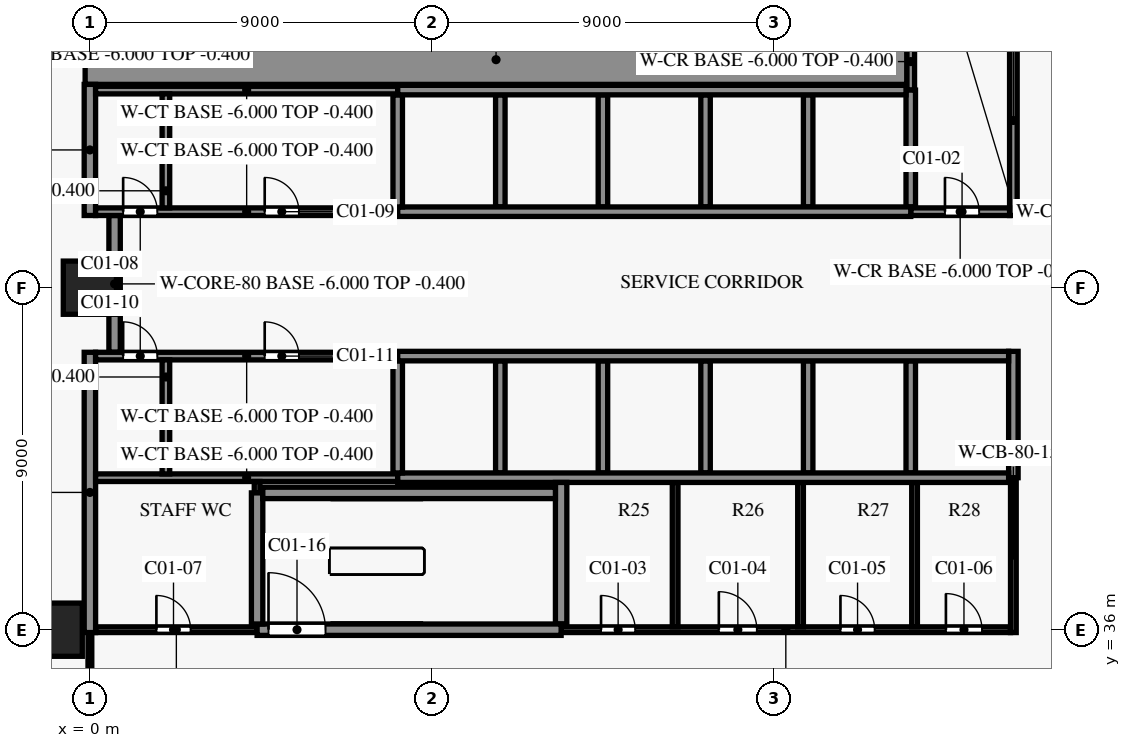
"""IFC4 building model, lengths in metres.
Left out: names, types, materials, properties, quantities, classifications, styles, units other than length and angle.
Written with IfcOpenShell. Run it as: python <this file> out.ifc"""

import sys

from ifc_helpers import new_model, si_unit, direction, frame, frame_2d, origin, origin_2d, place, context, subcontext, project, spatial, rectangle, extrude, element, fill, save


model = new_model("IFC4")
c1 = context("Model", 3, precision=1e-05, world=origin(), true_north=direction((0.0, 1.0)))
c2 = subcontext(c1, "Body", "Model", "MODEL_VIEW")
j1 = project(units=[si_unit("LENGTHUNIT", "METRE"), si_unit("PLANEANGLEUNIT", "RADIAN")], contexts=[c1])
p1 = place(None, origin())
s1 = spatial("IfcSite", under=j1, at=p1, CompositionType="ELEMENT")
p2 = place(p1, origin())
s2 = spatial("IfcBuilding", under=s1, at=p2, CompositionType="ELEMENT")
p3 = place(p2, frame((0.0, 0.0, -6.0)))
s3 = spatial("IfcBuildingStorey", under=s2, at=p3, CompositionType="ELEMENT", Elevation=-6.0)
for number, where, z_axis, x_axis in (
    (1, (0.0, 45.0, 0.0), (0.0, 0.0, 1.0), (1.0, 0.0, 0.0)),
    (2, (-0.9, 36.0, 0.0), (0.0, 0.0, 1.0), (1.0, 0.0, 0.0)),
):
    element("IfcColumn", number, at=place(p3, frame(where, z_axis=z_axis, x_axis=x_axis)), inside=s3, PredefinedType="COLUMN", context=c2, shape_type="SweptSolid", body=[
        extrude(rectangle(XDim=1.4, YDim=1.4, at=origin_2d()), origin(), (0.0, 0.0, 1.0), 6.0),
    ])
p4 = place(p3, frame((0.15, 36.0, 0.0), z_axis=(0.0, 0.0, 1.0), x_axis=(1.0, 0.0, 0.0)))
e3 = element("IfcWall", 3, at=p4, inside=s3, PredefinedType="PARTITIONING", context=c2, shape_type="SweptSolid", body=[
    extrude(rectangle(XDim=4.25, YDim=0.15, at=frame_2d((2.125, 0.0))), origin(), (0.0, 0.0, 1.0), 5.6),
])
p5 = place(p4, frame((1.6, 0.0, 0.0)))
e4 = element("IfcOpeningElement", 4, at=p5, cuts=e3, PredefinedType="OPENING", context=c2, shape_type="SweptSolid", body=[
    extrude(rectangle(XDim=0.9, YDim=2.1, at=frame_2d((0.45, 1.05))), frame((0.0, 0.085, 0.0), z_axis=(0.0, -1.0, 0.0), x_axis=(1.0, 0.0, 0.0)), (0.0, 0.0, 1.0), 0.17),
])
p6 = place(p3, frame((12.4, 36.0, 0.0), z_axis=(0.0, 0.0, 1.0), x_axis=(1.0, 0.0, 0.0)))
e5 = element("IfcWall", 5, at=p6, inside=s3, PredefinedType="SHEAR", context=c2, shape_type="SweptSolid", body=[
    extrude(rectangle(XDim=11.825, YDim=0.15, at=frame_2d((5.913, 0.0))), origin(), (0.0, 0.0, 1.0), 5.6),
])
p7 = place(p6, frame((1.05, 0.0, 0.0)))
e6 = element("IfcOpeningElement", 6, at=p7, cuts=e5, PredefinedType="OPENING", context=c2, shape_type="SweptSolid", body=[
    extrude(rectangle(XDim=0.9, YDim=2.1, at=frame_2d((0.45, 1.05))), frame((0.0, 0.085, 0.0), z_axis=(0.0, -1.0, 0.0), x_axis=(1.0, 0.0, 0.0)), (0.0, 0.0, 1.0), 0.17),
])
p8 = place(p6, frame((4.15, 0.0, 0.0)))
e7 = element("IfcOpeningElement", 7, at=p8, cuts=e5, PredefinedType="OPENING", context=c2, shape_type="SweptSolid", body=[
    extrude(rectangle(XDim=1.0, YDim=2.1, at=frame_2d((0.5, 1.05))), frame((0.0, 0.085, 0.0), z_axis=(0.0, -1.0, 0.0), x_axis=(1.0, 0.0, 0.0)), (0.0, 0.0, 1.0), 0.17),
])
p9 = place(p6, frame((7.35, 0.0, 0.0)))
e8 = element("IfcOpeningElement", 8, at=p9, cuts=e5, PredefinedType="OPENING", context=c2, shape_type="SweptSolid", body=[
    extrude(rectangle(XDim=0.9, YDim=2.1, at=frame_2d((0.45, 1.05))), frame((0.0, 0.085, 0.0), z_axis=(0.0, -1.0, 0.0), x_axis=(1.0, 0.0, 0.0)), (0.0, 0.0, 1.0), 0.17),
])
p10 = place(p6, frame((10.125, 0.0, 0.0)))
e9 = element("IfcOpeningElement", 9, at=p10, cuts=e5, PredefinedType="OPENING", context=c2, shape_type="SweptSolid", body=[
    extrude(rectangle(XDim=0.95, YDim=2.1, at=frame_2d((0.475, 1.05))), frame((0.0, 0.085, 0.0), z_axis=(0.0, -1.0, 0.0), x_axis=(1.0, 0.0, 0.0)), (0.0, 0.0, 1.0), 0.17),
])
p11 = place(p3, frame((4.4, 36.0, 0.0), z_axis=(0.0, 0.0, 1.0), x_axis=(1.0, 0.0, 0.0)))
e10 = element("IfcWall", 10, at=p11, inside=s3, PredefinedType="SHEAR", context=c2, shape_type="SweptSolid", body=[
    extrude(rectangle(XDim=8.0, YDim=0.3, at=frame_2d((4.0, 0.0))), origin(), (0.0, 0.0, 1.0), 5.6),
])
p12 = place(p11, frame((0.3, 0.0, 0.0)))
e11 = element("IfcOpeningElement", 11, at=p12, cuts=e10, PredefinedType="OPENING", context=c2, shape_type="SweptSolid", body=[
    extrude(rectangle(XDim=1.5, YDim=2.2, at=frame_2d((0.75, 1.1))), frame((0.0, 0.16, 0.0), z_axis=(0.0, -1.0, 0.0), x_axis=(1.0, 0.0, 0.0)), (0.0, 0.0, 1.0), 0.32),
])
p13 = place(p3, frame((4.55, 39.6, 0.0), z_axis=(0.0, 0.0, 1.0), x_axis=(1.0, 0.0, 0.0)))
e12 = element("IfcWall", 12, at=p13, inside=s3, PredefinedType="SHEAR", context=c2, shape_type="SweptSolid", body=[
    extrude(rectangle(XDim=7.7, YDim=0.3, at=frame_2d((3.85, 0.0))), origin(), (0.0, 0.0, 1.0), 5.6),
])
p14 = place(p3, frame((0.15, 40.0, 0.0), z_axis=(0.0, 0.0, 1.0), x_axis=(1.0, 0.0, 0.0)))
e13 = element("IfcWall", 13, at=p14, inside=s3, PredefinedType="PARTITIONING", context=c2, shape_type="SweptSolid", body=[
    extrude(rectangle(XDim=7.95, YDim=0.2, at=frame_2d((3.975, 0.0))), origin(), (0.0, 0.0, 1.0), 5.6),
])
p15 = place(p3, frame((8.1, 40.0, 0.0), z_axis=(0.0, 0.0, 1.0), x_axis=(1.0, 0.0, 0.0)))
e14 = element("IfcWall", 14, at=p15, inside=s3, PredefinedType="SHEAR", context=c2, shape_type="SweptSolid", body=[
    extrude(rectangle(XDim=16.075, YDim=0.25, at=frame_2d((8.038, 0.0))), origin(), (0.0, 0.0, 1.0), 5.6),
])
p16 = place(p3, frame((0.15, 43.2, 0.0), z_axis=(0.0, 0.0, 1.0), x_axis=(1.0, 0.0, 0.0)))
e15 = element("IfcWall", 15, at=p16, inside=s3, PredefinedType="PARTITIONING", context=c2, shape_type="SweptSolid", body=[
    extrude(rectangle(XDim=7.95, YDim=0.2, at=frame_2d((3.975, 0.0))), origin(), (0.0, 0.0, 1.0), 5.6),
])
p17 = place(p16, frame((0.725, 0.0, 0.0)))
e16 = element("IfcOpeningElement", 16, at=p17, cuts=e15, PredefinedType="OPENING", context=c2, shape_type="SweptSolid", body=[
    extrude(rectangle(XDim=0.9, YDim=2.1, at=frame_2d((0.45, 1.05))), frame((0.0, 0.11, 0.0), z_axis=(0.0, -1.0, 0.0), x_axis=(1.0, 0.0, 0.0)), (0.0, 0.0, 1.0), 0.22),
])
p18 = place(p16, frame((4.45, 0.0, 0.0)))
e17 = element("IfcOpeningElement", 17, at=p18, cuts=e15, PredefinedType="OPENING", context=c2, shape_type="SweptSolid", body=[
    extrude(rectangle(XDim=0.9, YDim=2.1, at=frame_2d((0.45, 1.05))), frame((0.0, 0.11, 0.0), z_axis=(0.0, -1.0, 0.0), x_axis=(1.0, 0.0, 0.0)), (0.0, 0.0, 1.0), 0.22),
])
p19 = place(p3, frame((8.1, 43.2, 0.0), z_axis=(0.0, 0.0, 1.0), x_axis=(1.0, 0.0, 0.0)))
e18 = element("IfcWall", 18, at=p19, inside=s3, PredefinedType="SHEAR", context=c2, shape_type="SweptSolid", body=[
    extrude(rectangle(XDim=16.075, YDim=0.25, at=frame_2d((8.038, 0.0))), origin(), (0.0, 0.0, 1.0), 5.6),
])
p20 = place(p3, frame((0.15, 47.0, 0.0), z_axis=(0.0, 0.0, 1.0), x_axis=(1.0, 0.0, 0.0)))
e19 = element("IfcWall", 19, at=p20, inside=s3, PredefinedType="PARTITIONING", context=c2, shape_type="SweptSolid", body=[
    extrude(rectangle(XDim=7.95, YDim=0.2, at=frame_2d((3.975, 0.0))), origin(), (0.0, 0.0, 1.0), 5.6),
])
p21 = place(p20, frame((0.725, 0.0, 0.0)))
e20 = element("IfcOpeningElement", 20, at=p21, cuts=e19, PredefinedType="OPENING", context=c2, shape_type="SweptSolid", body=[
    extrude(rectangle(XDim=0.9, YDim=2.1, at=frame_2d((0.45, 1.05))), frame((0.0, 0.11, 0.0), z_axis=(0.0, -1.0, 0.0), x_axis=(1.0, 0.0, 0.0)), (0.0, 0.0, 1.0), 0.22),
])
p22 = place(p20, frame((4.45, 0.0, 0.0)))
e21 = element("IfcOpeningElement", 21, at=p22, cuts=e19, PredefinedType="OPENING", context=c2, shape_type="SweptSolid", body=[
    extrude(rectangle(XDim=0.9, YDim=2.1, at=frame_2d((0.45, 1.05))), frame((0.0, 0.11, 0.0), z_axis=(0.0, -1.0, 0.0), x_axis=(1.0, 0.0, 0.0)), (0.0, 0.0, 1.0), 0.22),
])
p23 = place(p3, frame((21.6, 47.0, 0.0), z_axis=(0.0, 0.0, 1.0), x_axis=(1.0, 0.0, 0.0)))
e22 = element("IfcWall", 22, at=p23, inside=s3, PredefinedType="PARTITIONING", context=c2, shape_type="SweptSolid", body=[
    extrude(rectangle(XDim=2.6, YDim=0.2, at=frame_2d((1.3, 0.0))), origin(), (0.0, 0.0, 1.0), 5.6),
])
p24 = place(p23, frame((0.9, 0.0, 0.0)))
e23 = element("IfcOpeningElement", 23, at=p24, cuts=e22, PredefinedType="OPENING", context=c2, shape_type="SweptSolid", body=[
    extrude(rectangle(XDim=0.9, YDim=2.1, at=frame_2d((0.45, 1.05))), frame((0.0, 0.11, 0.0), z_axis=(0.0, -1.0, 0.0), x_axis=(1.0, 0.0, 0.0)), (0.0, 0.0, 1.0), 0.22),
])
p25 = place(p3, frame((8.1, 47.0, 0.0), z_axis=(0.0, 0.0, 1.0), x_axis=(1.0, 0.0, 0.0)))
e24 = element("IfcWall", 24, at=p25, inside=s3, PredefinedType="SHEAR", context=c2, shape_type="SweptSolid", body=[
    extrude(rectangle(XDim=13.5, YDim=0.25, at=frame_2d((6.75, 0.0))), origin(), (0.0, 0.0, 1.0), 5.6),
])
p26 = place(p3, frame((0.15, 50.2, 0.0), z_axis=(0.0, 0.0, 1.0), x_axis=(1.0, 0.0, 0.0)))
e25 = element("IfcWall", 25, at=p26, inside=s3, PredefinedType="PARTITIONING", context=c2, shape_type="SweptSolid", body=[
    extrude(rectangle(XDim=7.95, YDim=0.2, at=frame_2d((3.975, 0.0))), origin(), (0.0, 0.0, 1.0), 5.6),
])
p27 = place(p3, frame((8.1, 50.2, 0.0), z_axis=(0.0, 0.0, 1.0), x_axis=(1.0, 0.0, 0.0)))
e26 = element("IfcWall", 26, at=p27, inside=s3, PredefinedType="SHEAR", context=c2, shape_type="SweptSolid", body=[
    extrude(rectangle(XDim=13.375, YDim=0.25, at=frame_2d((6.688, 0.0))), origin(), (0.0, 0.0, 1.0), 5.6),
])
p28 = place(p3, frame((-0.125, 51.0, 0.0), z_axis=(0.0, 0.0, 1.0), x_axis=(1.0, 0.0, 0.0)))
e27 = element("IfcWall", 27, at=p28, inside=s3, PredefinedType="SHEAR", context=c2, shape_type="SweptSolid", body=[
    extrude(rectangle(XDim=21.625, YDim=1.3, at=frame_2d((10.812, 0.0))), origin(), (0.0, 0.0, 1.0), 5.6),
])
p29 = place(p3, frame((0.0, 35.925, 0.0), z_axis=(0.0, 0.0, 1.0), x_axis=(0.0, 1.0, 0.0)))
e28 = element("IfcWall", 28, at=p29, inside=s3, PredefinedType="SHEAR", context=c2, shape_type="SweptSolid", body=[
    extrude(rectangle(XDim=7.375, YDim=0.3, at=frame_2d((3.688, 0.0))), origin(), (0.0, 0.0, 1.0), 5.6),
])
p30 = place(p3, frame((0.0, 46.9, 0.0), z_axis=(0.0, 0.0, 1.0), x_axis=(0.0, 1.0, 0.0)))
e29 = element("IfcWall", 29, at=p30, inside=s3, PredefinedType="SHEAR", context=c2, shape_type="SweptSolid", body=[
    extrude(rectangle(XDim=3.45, YDim=0.3, at=frame_2d((1.725, 0.0))), origin(), (0.0, 0.0, 1.0), 5.6),
])
p31 = place(p3, frame((0.65, 43.3, 0.0), z_axis=(0.0, 0.0, 1.0), x_axis=(0.0, 1.0, 0.0)))
e30 = element("IfcWall", 30, at=p31, inside=s3, PredefinedType="SHEAR", context=c2, shape_type="SweptSolid", body=[
    extrude(rectangle(XDim=3.6, YDim=0.3, at=frame_2d((1.8, 0.0))), origin(), (0.0, 0.0, 1.0), 5.6),
])
for number, where, z_axis, x_axis in (
    (31, (2.0, 40.1, 0.0), (0.0, 0.0, 1.0), (0.0, 1.0, 0.0)),
    (32, (2.0, 47.1, 0.0), (0.0, 0.0, 1.0), (0.0, 1.0, 0.0)),
):
    element("IfcWall", number, at=place(p3, frame(where, z_axis=z_axis, x_axis=x_axis)), inside=s3, PredefinedType="PARTITIONING", context=c2, shape_type="SweptSolid", body=[
        extrude(rectangle(XDim=3.0, YDim=0.2, at=frame_2d((1.5, 0.0))), origin(), (0.0, 0.0, 1.0), 5.6),
    ])
p32 = place(p3, frame((4.4, 39.6, 0.0), z_axis=(0.0, 0.0, 1.0), x_axis=(0.0, 1.0, 0.0)))
e33 = element("IfcWall", 33, at=p32, inside=s3, PredefinedType="PARTITIONING", context=c2, shape_type="SweptSolid", body=[
    extrude(rectangle(XDim=0.3, YDim=0.15, at=frame_2d((0.15, 0.0))), origin(), (0.0, 0.0, 1.0), 5.6),
])
p33 = place(p3, frame((4.4, 36.15, 0.0), z_axis=(0.0, 0.0, 1.0), x_axis=(0.0, 1.0, 0.0)))
e34 = element("IfcWall", 34, at=p33, inside=s3, PredefinedType="SHEAR", context=c2, shape_type="SweptSolid", body=[
    extrude(rectangle(XDim=3.45, YDim=0.3, at=frame_2d((1.725, 0.0))), origin(), (0.0, 0.0, 1.0), 5.6),
])
for number, where, z_axis, x_axis in (
    (35, (8.1, 40.125, 0.0), (0.0, 0.0, 1.0), (0.0, 1.0, 0.0)),
    (36, (8.1, 47.125, 0.0), (0.0, 0.0, 1.0), (0.0, 1.0, 0.0)),
    (37, (10.8, 40.125, 0.0), (0.0, 0.0, 1.0), (0.0, 1.0, 0.0)),
    (38, (10.8, 47.125, 0.0), (0.0, 0.0, 1.0), (0.0, 1.0, 0.0)),
):
    element("IfcWall", number, at=place(p3, frame(where, z_axis=z_axis, x_axis=x_axis)), inside=s3, PredefinedType="SHEAR", context=c2, shape_type="SweptSolid", body=[
        extrude(rectangle(XDim=2.95, YDim=0.25, at=frame_2d((1.475, 0.0))), origin(), (0.0, 0.0, 1.0), 5.6),
    ])
p34 = place(p3, frame((12.4, 36.15, 0.0), z_axis=(0.0, 0.0, 1.0), x_axis=(0.0, 1.0, 0.0)))
e39 = element("IfcWall", 39, at=p34, inside=s3, PredefinedType="SHEAR", context=c2, shape_type="SweptSolid", body=[
    extrude(rectangle(XDim=3.725, YDim=0.3, at=frame_2d((1.863, 0.0))), origin(), (0.0, 0.0, 1.0), 5.6),
])
for number, where, z_axis, x_axis in (
    (40, (13.5, 40.125, 0.0), (0.0, 0.0, 1.0), (0.0, 1.0, 0.0)),
    (41, (13.5, 47.125, 0.0), (0.0, 0.0, 1.0), (0.0, 1.0, 0.0)),
):
    element("IfcWall", number, at=place(p3, frame(where, z_axis=z_axis, x_axis=x_axis)), inside=s3, PredefinedType="SHEAR", context=c2, shape_type="SweptSolid", body=[
        extrude(rectangle(XDim=2.95, YDim=0.25, at=frame_2d((1.475, 0.0))), origin(), (0.0, 0.0, 1.0), 5.6),
    ])
p35 = place(p3, frame((15.4, 36.075, 0.0), z_axis=(0.0, 0.0, 1.0), x_axis=(0.0, 1.0, 0.0)))
e42 = element("IfcWall", 42, at=p35, inside=s3, PredefinedType="PARTITIONING", context=c2, shape_type="SweptSolid", body=[
    extrude(rectangle(XDim=3.8, YDim=0.15, at=frame_2d((1.9, 0.0))), origin(), (0.0, 0.0, 1.0), 5.6),
])
for number, where, z_axis, x_axis in (
    (43, (16.2, 40.125, 0.0), (0.0, 0.0, 1.0), (0.0, 1.0, 0.0)),
    (44, (16.2, 47.125, 0.0), (0.0, 0.0, 1.0), (0.0, 1.0, 0.0)),
):
    element("IfcWall", number, at=place(p3, frame(where, z_axis=z_axis, x_axis=x_axis)), inside=s3, PredefinedType="SHEAR", context=c2, shape_type="SweptSolid", body=[
        extrude(rectangle(XDim=2.95, YDim=0.25, at=frame_2d((1.475, 0.0))), origin(), (0.0, 0.0, 1.0), 5.6),
    ])
p36 = place(p3, frame((18.7, 36.075, 0.0), z_axis=(0.0, 0.0, 1.0), x_axis=(0.0, 1.0, 0.0)))
e45 = element("IfcWall", 45, at=p36, inside=s3, PredefinedType="PARTITIONING", context=c2, shape_type="SweptSolid", body=[
    extrude(rectangle(XDim=3.8, YDim=0.15, at=frame_2d((1.9, 0.0))), origin(), (0.0, 0.0, 1.0), 5.6),
])
for number, where, z_axis, x_axis in (
    (46, (18.9, 40.125, 0.0), (0.0, 0.0, 1.0), (0.0, 1.0, 0.0)),
    (47, (18.9, 47.125, 0.0), (0.0, 0.0, 1.0), (0.0, 1.0, 0.0)),
):
    element("IfcWall", number, at=place(p3, frame(where, z_axis=z_axis, x_axis=x_axis)), inside=s3, PredefinedType="SHEAR", context=c2, shape_type="SweptSolid", body=[
        extrude(rectangle(XDim=2.95, YDim=0.25, at=frame_2d((1.475, 0.0))), origin(), (0.0, 0.0, 1.0), 5.6),
    ])
p37 = place(p3, frame((21.6, 50.2, 0.0), z_axis=(0.0, 0.0, 1.0), x_axis=(0.0, 1.0, 0.0)))
e48 = element("IfcWall", 48, at=p37, inside=s3, PredefinedType="PARTITIONING", context=c2, shape_type="SweptSolid", body=[
    extrude(rectangle(XDim=1.5, YDim=0.2, at=frame_2d((0.75, 0.0))), origin(), (0.0, 0.0, 1.0), 5.6),
])
p38 = place(p3, frame((21.6, 40.125, 0.0), z_axis=(0.0, 0.0, 1.0), x_axis=(0.0, 1.0, 0.0)))
e49 = element("IfcWall", 49, at=p38, inside=s3, PredefinedType="SHEAR", context=c2, shape_type="SweptSolid", body=[
    extrude(rectangle(XDim=2.95, YDim=0.25, at=frame_2d((1.475, 0.0))), origin(), (0.0, 0.0, 1.0), 5.6),
])
p39 = place(p3, frame((21.6, 47.125, 0.0), z_axis=(0.0, 0.0, 1.0), x_axis=(0.0, 1.0, 0.0)))
e50 = element("IfcWall", 50, at=p39, inside=s3, PredefinedType="SHEAR", context=c2, shape_type="SweptSolid", body=[
    extrude(rectangle(XDim=3.075, YDim=0.25, at=frame_2d((1.538, 0.0))), origin(), (0.0, 0.0, 1.0), 5.6),
])
p40 = place(p3, frame((21.7, 36.075, 0.0), z_axis=(0.0, 0.0, 1.0), x_axis=(0.0, 1.0, 0.0)))
e51 = element("IfcWall", 51, at=p40, inside=s3, PredefinedType="PARTITIONING", context=c2, shape_type="SweptSolid", body=[
    extrude(rectangle(XDim=3.8, YDim=0.15, at=frame_2d((1.9, 0.0))), origin(), (0.0, 0.0, 1.0), 5.6),
])
p41 = place(p3, frame((24.3, 35.925, 0.0), z_axis=(0.0, 0.0, 1.0), x_axis=(0.0, 1.0, 0.0)))
e52 = element("IfcWall", 52, at=p41, inside=s3, PredefinedType="SHEAR", context=c2, shape_type="SweptSolid", body=[
    extrude(rectangle(XDim=4.075, YDim=0.15, at=frame_2d((2.038, 0.0))), origin(), (0.0, 0.0, 1.0), 5.6),
])
p42 = place(p3, frame((24.3, 46.9, 0.0), z_axis=(0.0, 0.0, 1.0), x_axis=(0.0, 1.0, 0.0)))
e53 = element("IfcWall", 53, at=p42, inside=s3, PredefinedType="SHEAR", context=c2, shape_type="SweptSolid", body=[
    extrude(rectangle(XDim=5.0, YDim=0.2, at=frame_2d((2.5, 0.0))), origin(), (0.0, 0.0, 1.0), 5.6),
])
p43 = place(p3, frame((24.3, 40.0, 0.0), z_axis=(0.0, 0.0, 1.0), x_axis=(0.0, 1.0, 0.0)))
e54 = element("IfcWall", 54, at=p43, inside=s3, PredefinedType="SHEAR", context=c2, shape_type="SweptSolid", body=[
    extrude(rectangle(XDim=3.325, YDim=0.25, at=frame_2d((1.663, 0.0))), origin(), (0.0, 0.0, 1.0), 5.6),
])
p44 = place(p3, frame((0.0, 31.65, 0.0), z_axis=(0.0, 0.0, 1.0), x_axis=(0.0, 1.0, 0.0)))
e55 = element("IfcWall", 55, at=p44, inside=s3, PredefinedType="PARTITIONING", context=c2, shape_type="SweptSolid", body=[
    extrude(rectangle(XDim=4.255, YDim=0.1, at=frame_2d((2.127, 0.0))), origin(), (0.0, 0.0, 1.0), 5.58),
])
p45 = place(p24, origin())
e56 = element("IfcDoor", 56, at=p45, inside=s3, OperationType="SINGLE_SWING_LEFT", PredefinedType="DOOR", context=c2, shape_type="SweptSolid", body=[
    extrude(rectangle(XDim=0.9, YDim=2.1, at=frame_2d((0.45, 1.05))), frame((0.0, 0.025, 0.0), z_axis=(0.0, -1.0, 0.0), x_axis=(1.0, 0.0, 0.0)), (0.0, 0.0, 1.0), 0.05),
])
fill(e23, e56)
p46 = place(p7, origin())
e57 = element("IfcDoor", 57, at=p46, inside=s3, OperationType="SINGLE_SWING_RIGHT", PredefinedType="DOOR", context=c2, shape_type="SweptSolid", body=[
    extrude(rectangle(XDim=0.9, YDim=2.1, at=frame_2d((0.45, 1.05))), frame((0.0, 0.025, 0.0), z_axis=(0.0, -1.0, 0.0), x_axis=(1.0, 0.0, 0.0)), (0.0, 0.0, 1.0), 0.05),
])
fill(e6, e57)
p47 = place(p8, origin())
e58 = element("IfcDoor", 58, at=p47, inside=s3, OperationType="SINGLE_SWING_LEFT", PredefinedType="DOOR", context=c2, shape_type="SweptSolid", body=[
    extrude(rectangle(XDim=1.0, YDim=2.1, at=frame_2d((0.5, 1.05))), frame((0.0, 0.025, 0.0), z_axis=(0.0, -1.0, 0.0), x_axis=(1.0, 0.0, 0.0)), (0.0, 0.0, 1.0), 0.05),
])
fill(e7, e58)
p48 = place(p9, origin())
e59 = element("IfcDoor", 59, at=p48, inside=s3, OperationType="SINGLE_SWING_RIGHT", PredefinedType="DOOR", context=c2, shape_type="SweptSolid", body=[
    extrude(rectangle(XDim=0.9, YDim=2.1, at=frame_2d((0.45, 1.05))), frame((0.0, 0.025, 0.0), z_axis=(0.0, -1.0, 0.0), x_axis=(1.0, 0.0, 0.0)), (0.0, 0.0, 1.0), 0.05),
])
fill(e8, e59)
p49 = place(p10, origin())
e60 = element("IfcDoor", 60, at=p49, inside=s3, OperationType="SINGLE_SWING_LEFT", PredefinedType="DOOR", context=c2, shape_type="SweptSolid", body=[
    extrude(rectangle(XDim=0.95, YDim=2.1, at=frame_2d((0.475, 1.05))), frame((0.0, 0.025, 0.0), z_axis=(0.0, -1.0, 0.0), x_axis=(1.0, 0.0, 0.0)), (0.0, 0.0, 1.0), 0.05),
])
fill(e9, e60)
p50 = place(p5, origin())
e61 = element("IfcDoor", 61, at=p50, inside=s3, OperationType="SINGLE_SWING_LEFT", PredefinedType="DOOR", context=c2, shape_type="SweptSolid", body=[
    extrude(rectangle(XDim=0.9, YDim=2.1, at=frame_2d((0.45, 1.05))), frame((0.0, 0.025, 0.0), z_axis=(0.0, -1.0, 0.0), x_axis=(1.0, 0.0, 0.0)), (0.0, 0.0, 1.0), 0.05),
])
fill(e4, e61)
p51 = place(p21, origin())
e62 = element("IfcDoor", 62, at=p51, inside=s3, OperationType="SINGLE_SWING_RIGHT", PredefinedType="DOOR", context=c2, shape_type="SweptSolid", body=[
    extrude(rectangle(XDim=0.9, YDim=2.1, at=frame_2d((0.45, 1.05))), frame((0.0, 0.025, 0.0), z_axis=(0.0, -1.0, 0.0), x_axis=(1.0, 0.0, 0.0)), (0.0, 0.0, 1.0), 0.05),
])
fill(e20, e62)
p52 = place(p22, origin())
e63 = element("IfcDoor", 63, at=p52, inside=s3, OperationType="SINGLE_SWING_LEFT", PredefinedType="DOOR", context=c2, shape_type="SweptSolid", body=[
    extrude(rectangle(XDim=0.9, YDim=2.1, at=frame_2d((0.45, 1.05))), frame((0.0, 0.025, 0.0), z_axis=(0.0, -1.0, 0.0), x_axis=(1.0, 0.0, 0.0)), (0.0, 0.0, 1.0), 0.05),
])
fill(e21, e63)
p53 = place(p17, origin())
e64 = element("IfcDoor", 64, at=p53, inside=s3, OperationType="SINGLE_SWING_LEFT", PredefinedType="DOOR", context=c2, shape_type="SweptSolid", body=[
    extrude(rectangle(XDim=0.9, YDim=2.1, at=frame_2d((0.45, 1.05))), frame((0.0, 0.025, 0.0), z_axis=(0.0, -1.0, 0.0), x_axis=(1.0, 0.0, 0.0)), (0.0, 0.0, 1.0), 0.05),
])
fill(e16, e64)
p54 = place(p18, origin())
e65 = element("IfcDoor", 65, at=p54, inside=s3, OperationType="SINGLE_SWING_RIGHT", PredefinedType="DOOR", context=c2, shape_type="SweptSolid", body=[
    extrude(rectangle(XDim=0.9, YDim=2.1, at=frame_2d((0.45, 1.05))), frame((0.0, 0.025, 0.0), z_axis=(0.0, -1.0, 0.0), x_axis=(1.0, 0.0, 0.0)), (0.0, 0.0, 1.0), 0.05),
])
fill(e17, e65)
p55 = place(p12, origin())
e66 = element("IfcDoor", 66, at=p55, inside=s3, OperationType="SINGLE_SWING_RIGHT", PredefinedType="DOOR", context=c2, shape_type="SweptSolid", body=[
    extrude(rectangle(XDim=1.5, YDim=2.2, at=frame_2d((0.75, 1.1))), frame((0.0, 0.025, 0.0), z_axis=(0.0, -1.0, 0.0), x_axis=(1.0, 0.0, 0.0)), (0.0, 0.0, 1.0), 0.05),
])
fill(e11, e66)
save(model, sys.argv[1])
